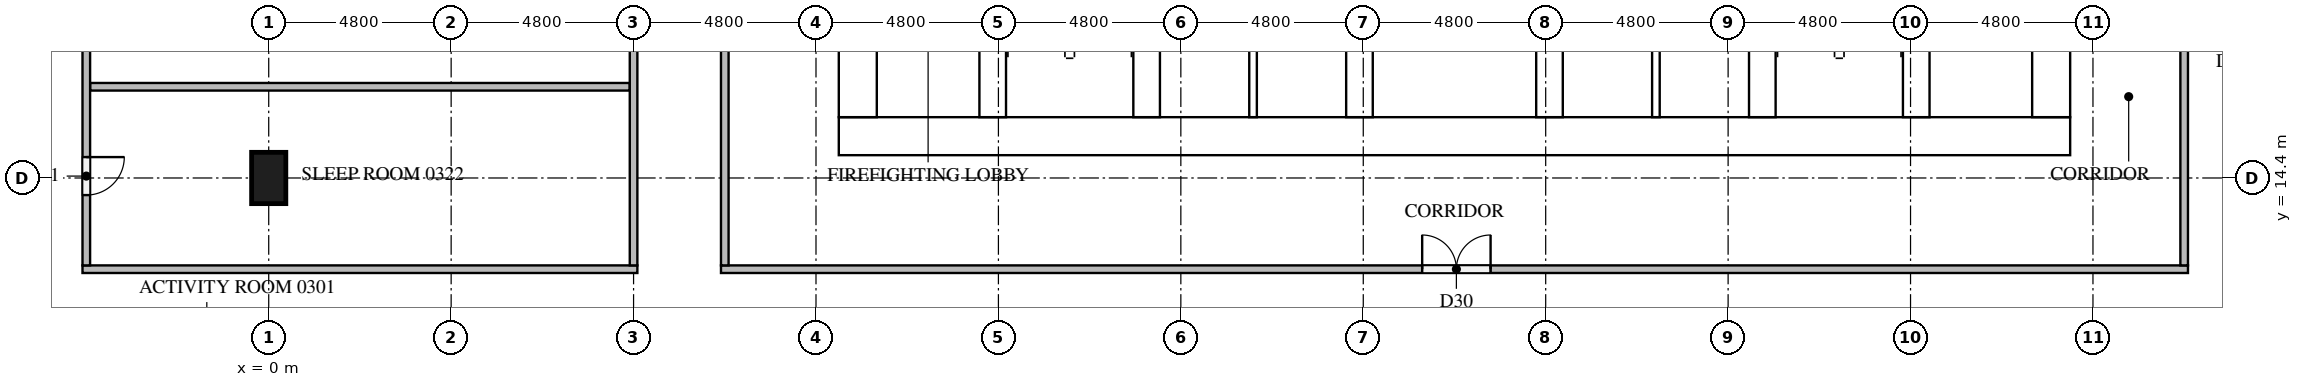
"""IFC4 building model, lengths in metres.
Left out: names, types, materials, properties, quantities, classifications, styles, units other than length and angle.
Written with IfcOpenShell. Run it as: python <this file> out.ifc"""

import sys

from ifc_helpers import new_model, si_unit, direction, frame, frame_2d, origin, origin_2d, place, context, subcontext, project, spatial, rectangle, extrude, element, fill, save


model = new_model("IFC4")
c1 = context("Model", 3, precision=1e-05, world=origin(), true_north=direction((0.0, 1.0)))
c2 = subcontext(c1, "Body", "Model", "MODEL_VIEW")
j1 = project(units=[si_unit("LENGTHUNIT", "METRE"), si_unit("PLANEANGLEUNIT", "RADIAN")], contexts=[c1])
p1 = place(None, origin())
s1 = spatial("IfcSite", under=j1, at=p1, CompositionType="ELEMENT")
p2 = place(p1, origin())
s2 = spatial("IfcBuilding", under=s1, at=p2, CompositionType="ELEMENT")
p3 = place(p2, frame((0.0, 0.0, 15.0)))
s3 = spatial("IfcBuildingStorey", under=s2, at=p3, CompositionType="ELEMENT", Elevation=15.0)
p4 = place(p3, frame((15.0, 15.5, 0.0), z_axis=(0.0, 0.0, 1.0), x_axis=(1.0, 0.0, 0.0)))
e1 = element("IfcWall", 1, at=p4, inside=s3, PredefinedType="SHEAR", context=c2, shape_type="SweptSolid", body=[
    extrude(rectangle(XDim=32.4, YDim=1.0, at=frame_2d((16.2, 0.0))), origin(), (0.0, 0.0, 1.0), 4.2),
])
p5 = place(p4, frame((15.3, 0.0, 0.0)))
e2 = element("IfcOpeningElement", 2, at=p5, cuts=e1, PredefinedType="OPENING", context=c2, shape_type="SweptSolid", body=[
    extrude(rectangle(XDim=1.8, YDim=2.1, at=frame_2d((0.9, 1.05))), frame((0.0, 0.51, 0.0), z_axis=(0.0, -1.0, 0.0), x_axis=(1.0, 0.0, 0.0)), (0.0, 0.0, 1.0), 1.02),
])
p6 = place(p3, frame((15.5, 16.0, 0.0), z_axis=(0.0, 0.0, 1.0), x_axis=(0.0, 1.0, 0.0)))
e3 = element("IfcWall", 3, at=p6, inside=s3, PredefinedType="SHEAR", context=c2, shape_type="SweptSolid", body=[
    extrude(rectangle(XDim=20.8, YDim=1.0, at=frame_2d((10.4, 0.0))), origin(), (0.0, 0.0, 1.0), 4.2),
])
p7 = place(p6, frame((4.76, 0.0, 0.0)))
e4 = element("IfcOpeningElement", 4, at=p7, cuts=e3, PredefinedType="OPENING", context=c2, shape_type="SweptSolid", body=[
    extrude(rectangle(XDim=1.2, YDim=2.1, at=frame_2d((0.6, 1.05))), frame((0.0, 0.51, 0.0), z_axis=(0.0, -1.0, 0.0), x_axis=(1.0, 0.0, 0.0)), (0.0, 0.0, 1.0), 1.02),
])
p8 = place(p3, frame((46.9, 16.0, 0.0), z_axis=(0.0, 0.0, 1.0), x_axis=(0.0, 1.0, 0.0)))
e5 = element("IfcWall", 5, at=p8, inside=s3, PredefinedType="SHEAR", context=c2, shape_type="SweptSolid", body=[
    extrude(rectangle(XDim=20.8, YDim=1.0, at=frame_2d((10.4, 0.0))), origin(), (0.0, 0.0, 1.0), 4.2),
])
p9 = place(p8, frame((10.1, 0.0, 0.0)))
e6 = element("IfcOpeningElement", 6, at=p9, cuts=e5, PredefinedType="OPENING", context=c2, shape_type="SweptSolid", body=[
    extrude(rectangle(XDim=1.2, YDim=2.1, at=frame_2d((0.6, 1.05))), frame((0.0, 0.51, 0.0), z_axis=(0.0, -1.0, 0.0), x_axis=(1.0, 0.0, 0.0)), (0.0, 0.0, 1.0), 1.02),
])
p10 = place(p3, frame((19.05, 16.0, 0.0), z_axis=(0.0, 0.0, 1.0), x_axis=(0.0, 1.0, 0.0)))
e7 = element("IfcWall", 7, at=p10, inside=s3, PredefinedType="SHEAR", context=c2, shape_type="SweptSolid", body=[
    extrude(rectangle(XDim=14.9, YDim=0.7, at=frame_2d((7.45, 0.0))), origin(), (0.0, 0.0, 1.0), 4.2),
])
p11 = place(p10, frame((9.45, 0.0, 0.0)))
e8 = element("IfcOpeningElement", 8, at=p11, cuts=e7, PredefinedType="OPENING", context=c2, shape_type="SweptSolid", body=[
    extrude(rectangle(XDim=1.1, YDim=2.1, at=frame_2d((0.55, 1.05))), frame((0.0, 0.36, 0.0), z_axis=(0.0, -1.0, 0.0), x_axis=(1.0, 0.0, 0.0)), (0.0, 0.0, 1.0), 0.72),
])
p12 = place(p10, frame((12.95, 0.0, 0.0)))
e9 = element("IfcOpeningElement", 9, at=p12, cuts=e7, PredefinedType="OPENING", context=c2, shape_type="SweptSolid", body=[
    extrude(rectangle(XDim=1.1, YDim=2.1, at=frame_2d((0.55, 1.05))), frame((0.0, 0.36, 0.0), z_axis=(0.0, -1.0, 0.0), x_axis=(1.0, 0.0, 0.0)), (0.0, 0.0, 1.0), 0.72),
])
p13 = place(p10, frame((0.2, 0.0, 0.0)))
e10 = element("IfcOpeningElement", 10, at=p13, cuts=e7, PredefinedType="OPENING", context=c2, shape_type="SweptSolid", body=[
    extrude(rectangle(XDim=1.2, YDim=2.1, at=frame_2d((0.6, 1.05))), frame((0.0, 0.36, 0.0), z_axis=(0.0, -1.0, 0.0), x_axis=(1.0, 0.0, 0.0)), (0.0, 0.0, 1.0), 0.72),
])
p14 = place(p3, frame((23.1, 16.0, 0.0), z_axis=(0.0, 0.0, 1.0), x_axis=(0.0, 1.0, 0.0)))
e11 = element("IfcWall", 11, at=p14, inside=s3, PredefinedType="SHEAR", context=c2, shape_type="SweptSolid", body=[
    extrude(rectangle(XDim=20.8, YDim=0.7, at=frame_2d((10.4, 0.0))), origin(), (0.0, 0.0, 1.0), 4.2),
])
p15 = place(p3, frame((39.3, 16.0, 0.0), z_axis=(0.0, 0.0, 1.0), x_axis=(0.0, 1.0, 0.0)))
e12 = element("IfcWall", 12, at=p15, inside=s3, PredefinedType="SHEAR", context=c2, shape_type="SweptSolid", body=[
    extrude(rectangle(XDim=8.25, YDim=0.7, at=frame_2d((4.125, 0.0))), origin(), (0.0, 0.0, 1.0), 4.2),
])
p16 = place(p3, frame((43.35, 16.0, 0.0), z_axis=(0.0, 0.0, 1.0), x_axis=(0.0, 1.0, 0.0)))
e13 = element("IfcWall", 13, at=p16, inside=s3, PredefinedType="SHEAR", context=c2, shape_type="SweptSolid", body=[
    extrude(rectangle(XDim=8.25, YDim=0.7, at=frame_2d((4.125, 0.0))), origin(), (0.0, 0.0, 1.0), 4.2),
])
p17 = place(p16, frame((0.2, 0.0, 0.0)))
e14 = element("IfcOpeningElement", 14, at=p17, cuts=e13, PredefinedType="OPENING", context=c2, shape_type="SweptSolid", body=[
    extrude(rectangle(XDim=1.2, YDim=2.1, at=frame_2d((0.6, 1.05))), frame((0.0, 0.36, 0.0), z_axis=(0.0, -1.0, 0.0), x_axis=(1.0, 0.0, 0.0)), (0.0, 0.0, 1.0), 0.72),
])
for number, where, z_axis, x_axis in (
    (15, (28.7, 16.0, 0.0), (0.0, 0.0, 1.0), (0.0, 1.0, 0.0)),
    (16, (33.7, 16.0, 0.0), (0.0, 0.0, 1.0), (0.0, 1.0, 0.0)),
):
    element("IfcWall", number, at=place(p3, frame(where, z_axis=z_axis, x_axis=x_axis)), inside=s3, PredefinedType="SHEAR", context=c2, shape_type="SweptSolid", body=[
        extrude(rectangle(XDim=2.4, YDim=0.7, at=frame_2d((1.2, 0.0))), origin(), (0.0, 0.0, 1.0), 4.2),
    ])
p18 = place(p3, frame((0.0, 14.4, 0.0), z_axis=(0.0, 0.0, 1.0), x_axis=(0.0, 1.0, 0.0)))
e17 = element("IfcColumn", 17, at=p18, inside=s3, PredefinedType="COLUMN", context=c2, shape_type="SweptSolid", body=[
    extrude(rectangle(XDim=1.35, YDim=0.9, at=origin_2d()), origin(), (0.0, 0.0, 1.0), 4.2),
])
for number, where, z_axis, x_axis in (
    (18, (25.9, 16.0, 0.0), (0.0, 0.0, 1.0), (0.0, 1.0, 0.0)),
    (19, (36.5, 16.0, 0.0), (0.0, 0.0, 1.0), (0.0, 1.0, 0.0)),
):
    element("IfcWall", number, at=place(p3, frame(where, z_axis=z_axis, x_axis=x_axis)), inside=s3, PredefinedType="SOLIDWALL", context=c2, shape_type="SweptSolid", body=[
        extrude(rectangle(XDim=2.4, YDim=0.2, at=frame_2d((1.2, 0.0))), origin(), (0.0, 0.0, 1.0), 4.2),
    ])
p19 = place(p3, frame((-4.9, 12.0, 0.0), z_axis=(0.0, 0.0, 1.0), x_axis=(1.0, 0.0, 0.0)))
e20 = element("IfcWall", 20, at=p19, inside=s3, PredefinedType="PARTITIONING", context=c2, shape_type="SweptSolid", body=[
    extrude(rectangle(XDim=14.6, YDim=0.2, at=frame_2d((7.3, 0.0))), origin(), (0.0, 0.0, 1.0), 4.2),
])
p20 = place(p3, frame((11.9, 12.0, 0.0), z_axis=(0.0, 0.0, 1.0), x_axis=(1.0, 0.0, 0.0)))
e21 = element("IfcWall", 21, at=p20, inside=s3, PredefinedType="PARTITIONING", context=c2, shape_type="SweptSolid", body=[
    extrude(rectangle(XDim=38.6, YDim=0.2, at=frame_2d((19.3, 0.0))), origin(), (0.0, 0.0, 1.0), 4.2),
])
p21 = place(p20, frame((18.45, 0.0, 0.0)))
e22 = element("IfcOpeningElement", 22, at=p21, cuts=e21, PredefinedType="OPENING", context=c2, shape_type="SweptSolid", body=[
    extrude(rectangle(XDim=1.8, YDim=2.1, at=frame_2d((0.9, 1.05))), frame((0.0, 0.11, 0.0), z_axis=(0.0, -1.0, 0.0), x_axis=(1.0, 0.0, 0.0)), (0.0, 0.0, 1.0), 0.22),
])
p22 = place(p3, frame((-4.7, 16.8, 0.0), z_axis=(0.0, 0.0, 1.0), x_axis=(1.0, 0.0, 0.0)))
e23 = element("IfcWall", 23, at=p22, inside=s3, PredefinedType="PARTITIONING", context=c2, shape_type="SweptSolid", body=[
    extrude(rectangle(XDim=14.2, YDim=0.2, at=frame_2d((7.1, 0.0))), origin(), (0.0, 0.0, 1.0), 4.2),
])
p23 = place(p3, frame((-4.8, 40.7, 0.0), z_axis=(0.0, 0.0, 1.0), x_axis=(0.0, -1.0, 0.0)))
e24 = element("IfcWall", 24, at=p23, inside=s3, PredefinedType="PARTITIONING", context=c2, shape_type="SweptSolid", body=[
    extrude(rectangle(XDim=28.6, YDim=0.2, at=frame_2d((14.3, 0.0))), origin(), (0.0, 0.0, 1.0), 4.2),
])
p24 = place(p23, frame((25.75, 0.0, 0.0)))
e25 = element("IfcOpeningElement", 25, at=p24, cuts=e24, PredefinedType="OPENING", context=c2, shape_type="SweptSolid", body=[
    extrude(rectangle(XDim=1.0, YDim=2.1, at=frame_2d((0.5, 1.05))), frame((0.0, 0.11, 0.0), z_axis=(0.0, -1.0, 0.0), x_axis=(1.0, 0.0, 0.0)), (0.0, 0.0, 1.0), 0.22),
])
p25 = place(p23, frame((18.05, 0.0, 0.0)))
e26 = element("IfcOpeningElement", 26, at=p25, cuts=e24, PredefinedType="OPENING", context=c2, shape_type="SweptSolid", body=[
    extrude(rectangle(XDim=1.0, YDim=2.1, at=frame_2d((0.5, 1.05))), frame((0.0, 0.11, 0.0), z_axis=(0.0, -1.0, 0.0), x_axis=(1.0, 0.0, 0.0)), (0.0, 0.0, 1.0), 0.22),
])
p26 = place(p3, frame((9.6, 12.1, 0.0), z_axis=(0.0, 0.0, 1.0), x_axis=(0.0, 1.0, 0.0)))
e27 = element("IfcWall", 27, at=p26, inside=s3, PredefinedType="PARTITIONING", context=c2, shape_type="SweptSolid", body=[
    extrude(rectangle(XDim=28.6, YDim=0.2, at=frame_2d((14.3, 0.0))), origin(), (0.0, 0.0, 1.0), 4.2),
])
p27 = place(p26, frame((21.55, 0.0, 0.0)))
e28 = element("IfcOpeningElement", 28, at=p27, cuts=e27, PredefinedType="OPENING", context=c2, shape_type="SweptSolid", body=[
    extrude(rectangle(XDim=1.0, YDim=2.1, at=frame_2d((0.5, 1.05))), frame((0.0, 0.11, 0.0), z_axis=(0.0, -1.0, 0.0), x_axis=(1.0, 0.0, 0.0)), (0.0, 0.0, 1.0), 0.22),
])
p28 = place(p3, frame((12.0, 40.7, 0.0), z_axis=(0.0, 0.0, 1.0), x_axis=(0.0, -1.0, 0.0)))
e29 = element("IfcWall", 29, at=p28, inside=s3, PredefinedType="PARTITIONING", context=c2, shape_type="SweptSolid", body=[
    extrude(rectangle(XDim=28.6, YDim=0.2, at=frame_2d((14.3, 0.0))), origin(), (0.0, 0.0, 1.0), 4.2),
])
p29 = place(p28, frame((6.85, 0.0, 0.0)))
e30 = element("IfcOpeningElement", 30, at=p29, cuts=e29, PredefinedType="OPENING", context=c2, shape_type="SweptSolid", body=[
    extrude(rectangle(XDim=1.8, YDim=2.1, at=frame_2d((0.9, 1.05))), frame((0.0, 0.11, 0.0), z_axis=(0.0, -1.0, 0.0), x_axis=(1.0, 0.0, 0.0)), (0.0, 0.0, 1.0), 0.22),
])
p30 = place(p3, frame((50.4, 12.1, 0.0), z_axis=(0.0, 0.0, 1.0), x_axis=(0.0, 1.0, 0.0)))
e31 = element("IfcWall", 31, at=p30, inside=s3, PredefinedType="PARTITIONING", context=c2, shape_type="SweptSolid", body=[
    extrude(rectangle(XDim=28.6, YDim=0.2, at=frame_2d((14.3, 0.0))), origin(), (0.0, 0.0, 1.0), 4.2),
])
p31 = place(p30, frame((20.05, 0.0, 0.0)))
e32 = element("IfcOpeningElement", 32, at=p31, cuts=e31, PredefinedType="OPENING", context=c2, shape_type="SweptSolid", body=[
    extrude(rectangle(XDim=1.8, YDim=2.1, at=frame_2d((0.9, 1.05))), frame((0.0, 0.11, 0.0), z_axis=(0.0, -1.0, 0.0), x_axis=(1.0, 0.0, 0.0)), (0.0, 0.0, 1.0), 0.22),
])
p32 = place(p13, frame((1.2, 0.0, 0.0), z_axis=(0.0, 0.0, 1.0), x_axis=(-1.0, 0.0, 0.0)))
e33 = element("IfcDoor", 33, at=p32, inside=s3, OperationType="SINGLE_SWING_LEFT", PredefinedType="DOOR", context=c2, shape_type="SweptSolid", body=[
    extrude(rectangle(XDim=1.2, YDim=2.1, at=frame_2d((0.6, 1.05))), frame((0.0, 0.025, 0.0), z_axis=(0.0, -1.0, 0.0), x_axis=(1.0, 0.0, 0.0)), (0.0, 0.0, 1.0), 0.05),
])
fill(e10, e33)
p33 = place(p17, origin())
e34 = element("IfcDoor", 34, at=p33, inside=s3, OperationType="SINGLE_SWING_RIGHT", PredefinedType="DOOR", context=c2, shape_type="SweptSolid", body=[
    extrude(rectangle(XDim=1.2, YDim=2.1, at=frame_2d((0.6, 1.05))), frame((0.0, 0.025, 0.0), z_axis=(0.0, -1.0, 0.0), x_axis=(1.0, 0.0, 0.0)), (0.0, 0.0, 1.0), 0.05),
])
fill(e14, e34)
p34 = place(p5, frame((1.8, 0.0, 0.0), z_axis=(0.0, 0.0, 1.0), x_axis=(-1.0, 0.0, 0.0)))
e35 = element("IfcDoor", 35, at=p34, inside=s3, OperationType="DOUBLE_DOOR_SINGLE_SWING", PredefinedType="DOOR", context=c2, shape_type="SweptSolid", body=[
    extrude(rectangle(XDim=1.8, YDim=2.1, at=frame_2d((0.9, 1.05))), frame((0.0, 0.025, 0.0), z_axis=(0.0, -1.0, 0.0), x_axis=(1.0, 0.0, 0.0)), (0.0, 0.0, 1.0), 0.05),
])
fill(e2, e35)
p35 = place(p24, origin())
e36 = element("IfcDoor", 36, at=p35, inside=s3, OperationType="SINGLE_SWING_LEFT", PredefinedType="DOOR", context=c2, shape_type="SweptSolid", body=[
    extrude(rectangle(XDim=1.0, YDim=2.1, at=frame_2d((0.5, 1.05))), frame((0.0, 0.025, 0.0), z_axis=(0.0, -1.0, 0.0), x_axis=(1.0, 0.0, 0.0)), (0.0, 0.0, 1.0), 0.05),
])
fill(e25, e36)
p36 = place(p21, origin())
e37 = element("IfcDoor", 37, at=p36, inside=s3, OperationType="DOUBLE_DOOR_SINGLE_SWING", PredefinedType="DOOR", context=c2, shape_type="SweptSolid", body=[
    extrude(rectangle(XDim=1.8, YDim=2.1, at=frame_2d((0.9, 1.05))), frame((0.0, 0.025, 0.0), z_axis=(0.0, -1.0, 0.0), x_axis=(1.0, 0.0, 0.0)), (0.0, 0.0, 1.0), 0.05),
])
fill(e22, e37)
save(model, sys.argv[1])
